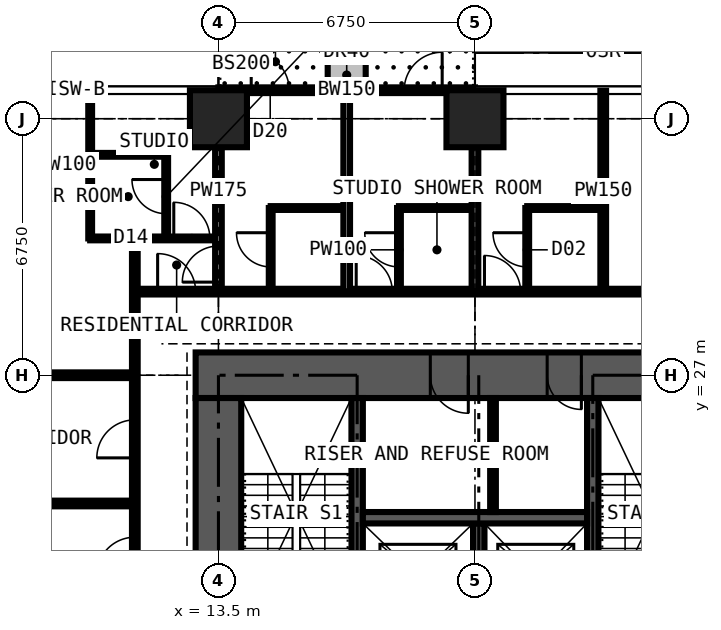
"""IFC4 building model, lengths in metres.
Left out: names, types, materials, properties, quantities, classifications, styles, units other than length and angle.
Written with IfcOpenShell. Run it as: python <this file> out.ifc"""

import sys

from ifc_helpers import new_model, si_unit, direction, frame, frame_2d, origin, origin_2d, place, context, subcontext, project, spatial, rectangle, extrude, element, fill, save


model = new_model("IFC4")
c1 = context("Model", 3, precision=1e-05, world=origin(), true_north=direction((0.0, 1.0)))
c2 = subcontext(c1, "Body", "Model", "MODEL_VIEW")
j1 = project(units=[si_unit("LENGTHUNIT", "METRE"), si_unit("PLANEANGLEUNIT", "RADIAN")], contexts=[c1])
p1 = place(None, origin())
s1 = spatial("IfcSite", under=j1, at=p1, CompositionType="ELEMENT")
p2 = place(p1, origin())
s2 = spatial("IfcBuilding", under=s1, at=p2, CompositionType="ELEMENT")
p3 = place(p2, frame((0.0, 0.0, 116.1)))
s3 = spatial("IfcBuildingStorey", under=s2, at=p3, CompositionType="ELEMENT", Elevation=116.1)
for number, where, z_axis, x_axis in (
    (1, (13.5, 33.75, 0.0), (0.0, 0.0, 1.0), (1.0, 0.0, 0.0)),
    (2, (20.25, 33.75, 0.0), (0.0, 0.0, 1.0), (1.0, 0.0, 0.0)),
):
    element("IfcColumn", number, at=place(p3, frame(where, z_axis=z_axis, x_axis=x_axis)), inside=s3, PredefinedType="COLUMN", context=c2, shape_type="SweptSolid", body=[
        extrude(rectangle(XDim=1.5, YDim=1.5, at=origin_2d()), origin(), (0.0, 0.0, 1.0), 3.6),
    ])
p4 = place(p3, frame((27.6, 27.0, 0.0), z_axis=(0.0, 0.0, 1.0), x_axis=(-1.0, 0.0, 0.0)))
e3 = element("IfcWall", 3, at=p4, inside=s3, PredefinedType="SHEAR", context=c2, shape_type="SweptSolid", body=[
    extrude(rectangle(XDim=14.7, YDim=1.2, at=frame_2d((7.35, 0.0))), origin(), (0.0, 0.0, 1.0), 3.6),
])
p5 = place(p4, frame((4.55, 0.0, 0.0)))
e4 = element("IfcOpeningElement", 4, at=p5, cuts=e3, PredefinedType="OPENING", context=c2, shape_type="SweptSolid", body=[
    extrude(rectangle(XDim=0.9, YDim=2.2, at=frame_2d((0.45, 1.1))), frame((0.0, 0.61, 0.0), z_axis=(0.0, -1.0, 0.0), x_axis=(1.0, 0.0, 0.0)), (0.0, 0.0, 1.0), 1.22),
])
p6 = place(p4, frame((7.525, 0.0, 0.0)))
e5 = element("IfcOpeningElement", 5, at=p6, cuts=e3, PredefinedType="OPENING", context=c2, shape_type="SweptSolid", body=[
    extrude(rectangle(XDim=1.0, YDim=2.2, at=frame_2d((0.5, 1.1))), frame((0.0, 0.61, 0.0), z_axis=(0.0, -1.0, 0.0), x_axis=(1.0, 0.0, 0.0)), (0.0, 0.0, 1.0), 1.22),
])
p7 = place(p3, frame((13.5, 26.4, 0.0), z_axis=(0.0, 0.0, 1.0), x_axis=(0.0, -1.0, 0.0)))
e6 = element("IfcWall", 6, at=p7, inside=s3, PredefinedType="SHEAR", context=c2, shape_type="SweptSolid", body=[
    extrude(rectangle(XDim=12.3, YDim=1.2, at=frame_2d((6.15, 0.0))), origin(), (0.0, 0.0, 1.0), 3.6),
])
p8 = place(p7, frame((7.45, 0.0, 0.0)))
e7 = element("IfcOpeningElement", 7, at=p8, cuts=e6, PredefinedType="OPENING", context=c2, shape_type="SweptSolid", body=[
    extrude(rectangle(XDim=1.2, YDim=2.2, at=frame_2d((0.6, 1.1))), frame((0.0, 0.61, 0.0), z_axis=(0.0, -1.0, 0.0), x_axis=(1.0, 0.0, 0.0)), (0.0, 0.0, 1.0), 1.22),
])
p9 = place(p3, frame((13.5, 34.5, 0.0), z_axis=(0.0, 0.0, 1.0), x_axis=(1.0, 0.0, 0.0)))
e8 = element("IfcWall", 8, at=p9, inside=s3, PredefinedType="SOLIDWALL", context=c2, shape_type="SweptSolid", body=[
    extrude(rectangle(XDim=6.75, YDim=0.15, at=frame_2d((3.375, 0.0))), origin(), (0.0, 0.0, 1.0), 3.375),
])
p10 = place(p9, frame((0.863, 0.0, 0.0)))
e9 = element("IfcOpeningElement", 9, at=p10, cuts=e8, PredefinedType="OPENING", context=c2, shape_type="SweptSolid", body=[
    extrude(rectangle(XDim=1.0, YDim=2.2, at=frame_2d((0.5, 1.1))), frame((0.0, 0.085, 0.0), z_axis=(0.0, -1.0, 0.0), x_axis=(1.0, 0.0, 0.0)), (0.0, 0.0, 1.0), 0.17),
])
p11 = place(p9, frame((1.975, 0.0, 0.9)))
e10 = element("IfcOpeningElement", 10, at=p11, cuts=e8, PredefinedType="OPENING", context=c2, shape_type="SweptSolid", body=[
    extrude(rectangle(XDim=1.2, YDim=1.8, at=frame_2d((0.6, 0.9))), frame((0.0, 0.085, 0.0), z_axis=(0.0, -1.0, 0.0), x_axis=(1.0, 0.0, 0.0)), (0.0, 0.0, 1.0), 0.17),
])
p12 = place(p9, frame((4.887, 0.0, 0.0)))
e11 = element("IfcOpeningElement", 11, at=p12, cuts=e8, PredefinedType="OPENING", context=c2, shape_type="SweptSolid", body=[
    extrude(rectangle(XDim=1.0, YDim=2.2, at=frame_2d((0.5, 1.1))), frame((0.0, 0.085, 0.0), z_axis=(0.0, -1.0, 0.0), x_axis=(1.0, 0.0, 0.0)), (0.0, 0.0, 1.0), 0.17),
])
p13 = place(p9, frame((3.575, 0.0, 0.9)))
e12 = element("IfcOpeningElement", 12, at=p13, cuts=e8, PredefinedType="OPENING", context=c2, shape_type="SweptSolid", body=[
    extrude(rectangle(XDim=1.2, YDim=1.8, at=frame_2d((0.6, 0.9))), frame((0.0, 0.085, 0.0), z_axis=(0.0, -1.0, 0.0), x_axis=(1.0, 0.0, 0.0)), (0.0, 0.0, 1.0), 0.17),
])
p14 = place(p3, frame((16.875, 34.6, 0.0), z_axis=(0.0, 0.0, 1.0), x_axis=(0.0, 1.0, 0.0)))
e13 = element("IfcWall", 13, at=p14, inside=s3, PredefinedType="USERDEFINED", context=c2, shape_type="SweptSolid", body=[
    extrude(rectangle(XDim=2.2, YDim=1.0, at=frame_2d((1.1, 0.0))), origin(), (0.0, 0.0, 1.0), 0.9),
])
for number, where, z_axis, x_axis in (
    (14, (17.15, 20.3, 0.0), (0.0, 0.0, 1.0), (0.0, 1.0, 0.0)),
    (15, (23.35, 20.3, 0.0), (0.0, 0.0, 1.0), (0.0, 1.0, 0.0)),
):
    element("IfcWall", number, at=place(p3, frame(where, z_axis=z_axis, x_axis=x_axis)), inside=s3, PredefinedType="SHEAR", context=c2, shape_type="SweptSolid", body=[
        extrude(rectangle(XDim=6.1, YDim=0.3, at=frame_2d((3.05, 0.0))), origin(), (0.0, 0.0, 1.0), 3.6),
    ])
p15 = place(p3, frame((20.35, 20.3, 0.0), z_axis=(0.0, 0.0, 1.0), x_axis=(0.0, 1.0, 0.0)))
e16 = element("IfcWall", 16, at=p15, inside=s3, PredefinedType="SHEAR", context=c2, shape_type="SweptSolid", body=[
    extrude(rectangle(XDim=2.8, YDim=0.3, at=frame_2d((1.4, 0.0))), origin(), (0.0, 0.0, 1.0), 3.6),
])
p16 = place(p3, frame((17.3, 23.25, 0.0), z_axis=(0.0, 0.0, 1.0), x_axis=(1.0, 0.0, 0.0)))
e17 = element("IfcWall", 17, at=p16, inside=s3, PredefinedType="SHEAR", context=c2, shape_type="SweptSolid", body=[
    extrude(rectangle(XDim=5.9, YDim=0.3, at=frame_2d((2.95, 0.0))), origin(), (0.0, 0.0, 1.0), 3.6),
])
p17 = place(p3, frame((20.725, 23.4, 0.0), z_axis=(0.0, 0.0, 1.0), x_axis=(0.0, 1.0, 0.0)))
e18 = element("IfcWall", 18, at=p17, inside=s3, PredefinedType="PARTITIONING", context=c2, shape_type="SweptSolid", body=[
    extrude(rectangle(XDim=3.0, YDim=0.15, at=frame_2d((1.5, 0.0))), origin(), (0.0, 0.0, 1.0), 3.375),
])
p18 = place(p3, frame((-0.734, 23.625, 0.0), z_axis=(0.0, 0.0, 1.0), x_axis=(1.0, 0.0, 0.0)))
e19 = element("IfcWall", 19, at=p18, inside=s3, PredefinedType="PARTITIONING", context=c2, shape_type="SweptSolid", body=[
    extrude(rectangle(XDim=12.034, YDim=0.15, at=frame_2d((6.017, 0.0))), origin(), (0.0, 0.0, 1.0), 3.375),
])
p19 = place(p3, frame((-0.734, 27.0, 0.0), z_axis=(0.0, 0.0, 1.0), x_axis=(1.0, 0.0, 0.0)))
e20 = element("IfcWall", 20, at=p19, inside=s3, PredefinedType="PARTITIONING", context=c2, shape_type="SweptSolid", body=[
    extrude(rectangle(XDim=12.034, YDim=0.15, at=frame_2d((6.017, 0.0))), origin(), (0.0, 0.0, 1.0), 2.806),
])
p20 = place(p19, frame((8.234, 0.0, 0.0)))
e21 = element("IfcOpeningElement", 21, at=p20, cuts=e20, PredefinedType="OPENING", context=c2, shape_type="SweptSolid", body=[
    extrude(rectangle(XDim=1.0, YDim=2.2, at=frame_2d((0.5, 1.1))), frame((0.0, 0.085, 0.0), z_axis=(0.0, -1.0, 0.0), x_axis=(1.0, 0.0, 0.0)), (0.0, 0.0, 1.0), 0.17),
])
p21 = place(p3, frame((10.125, 30.6, 0.0), z_axis=(0.0, 0.0, 1.0), x_axis=(0.0, 1.0, 0.0)))
e22 = element("IfcWall", 22, at=p21, inside=s3, PredefinedType="PARTITIONING", context=c2, shape_type="SweptSolid", body=[
    extrude(rectangle(XDim=3.884, YDim=0.1, at=frame_2d((1.942, 0.0))), origin(), (0.0, 0.0, 1.0), 3.375),
])
p22 = place(p3, frame((10.125, 30.6, 0.0), z_axis=(0.0, 0.0, 1.0), x_axis=(1.0, 0.0, 0.0)))
e23 = element("IfcWall", 23, at=p22, inside=s3, PredefinedType="PARTITIONING", context=c2, shape_type="SweptSolid", body=[
    extrude(rectangle(XDim=3.375, YDim=0.1, at=frame_2d((1.688, 0.0))), origin(), (0.0, 0.0, 1.0), 3.375),
])
p23 = place(p22, frame((2.2, 0.0, 0.0)))
e24 = element("IfcOpeningElement", 24, at=p23, cuts=e23, PredefinedType="OPENING", context=c2, shape_type="SweptSolid", body=[
    extrude(rectangle(XDim=0.95, YDim=2.2, at=frame_2d((0.475, 1.1))), frame((0.0, 0.06, 0.0), z_axis=(0.0, -1.0, 0.0), x_axis=(1.0, 0.0, 0.0)), (0.0, 0.0, 1.0), 0.12),
])
p24 = place(p3, frame((10.125, 32.8, 0.0), z_axis=(0.0, 0.0, 1.0), x_axis=(1.0, 0.0, 0.0)))
e25 = element("IfcWall", 25, at=p24, inside=s3, PredefinedType="PARTITIONING", context=c2, shape_type="SweptSolid", body=[
    extrude(rectangle(XDim=2.0, YDim=0.1, at=frame_2d((1.0, 0.0))), origin(), (0.0, 0.0, 1.0), 3.375),
])
p25 = place(p3, frame((11.3, 11.3, 0.0), z_axis=(0.0, 0.0, 1.0), x_axis=(0.0, 1.0, 0.0)))
e26 = element("IfcWall", 26, at=p25, inside=s3, PredefinedType="PARTITIONING", context=c2, shape_type="SweptSolid", body=[
    extrude(rectangle(XDim=19.3, YDim=0.15, at=frame_2d((9.65, 0.0))), origin(), (0.0, 0.0, 1.0), 3.375),
])
p26 = place(p25, frame((13.525, 0.0, 0.0)))
e27 = element("IfcOpeningElement", 27, at=p26, cuts=e26, PredefinedType="OPENING", context=c2, shape_type="SweptSolid", body=[
    extrude(rectangle(XDim=1.0, YDim=2.2, at=frame_2d((0.5, 1.1))), frame((0.0, 0.085, 0.0), z_axis=(0.0, -1.0, 0.0), x_axis=(1.0, 0.0, 0.0)), (0.0, 0.0, 1.0), 0.17),
])
p27 = place(p25, frame((10.438, 0.0, 0.0)))
e28 = element("IfcOpeningElement", 28, at=p27, cuts=e26, PredefinedType="OPENING", context=c2, shape_type="SweptSolid", body=[
    extrude(rectangle(XDim=1.0, YDim=2.2, at=frame_2d((0.5, 1.1))), frame((0.0, 0.085, 0.0), z_axis=(0.0, -1.0, 0.0), x_axis=(1.0, 0.0, 0.0)), (0.0, 0.0, 1.0), 0.17),
])
p28 = place(p3, frame((11.3, 29.2, 0.0), z_axis=(0.0, 0.0, 1.0), x_axis=(1.0, 0.0, 0.0)))
e29 = element("IfcWall", 29, at=p28, inside=s3, PredefinedType="PARTITIONING", context=c2, shape_type="SweptSolid", body=[
    extrude(rectangle(XDim=19.075, YDim=0.15, at=frame_2d((9.538, 0.0))), origin(), (0.0, 0.0, 1.0), 3.375),
])
p29 = place(p28, frame((5.825, 0.0, 0.0)))
e30 = element("IfcOpeningElement", 30, at=p29, cuts=e29, PredefinedType="OPENING", context=c2, shape_type="SweptSolid", body=[
    extrude(rectangle(XDim=0.95, YDim=2.2, at=frame_2d((0.475, 1.1))), frame((0.0, 0.085, 0.0), z_axis=(0.0, -1.0, 0.0), x_axis=(1.0, 0.0, 0.0)), (0.0, 0.0, 1.0), 0.17),
])
p30 = place(p28, frame((9.2, 0.0, 0.0)))
e31 = element("IfcOpeningElement", 31, at=p30, cuts=e29, PredefinedType="OPENING", context=c2, shape_type="SweptSolid", body=[
    extrude(rectangle(XDim=0.95, YDim=2.2, at=frame_2d((0.475, 1.1))), frame((0.0, 0.085, 0.0), z_axis=(0.0, -1.0, 0.0), x_axis=(1.0, 0.0, 0.0)), (0.0, 0.0, 1.0), 0.17),
])
p31 = place(p28, frame((0.6, 0.0, 0.0)))
e32 = element("IfcOpeningElement", 32, at=p31, cuts=e29, PredefinedType="OPENING", context=c2, shape_type="SweptSolid", body=[
    extrude(rectangle(XDim=1.0, YDim=2.2, at=frame_2d((0.5, 1.1))), frame((0.0, 0.085, 0.0), z_axis=(0.0, -1.0, 0.0), x_axis=(1.0, 0.0, 0.0)), (0.0, 0.0, 1.0), 0.17),
])
p32 = place(p3, frame((12.125, 30.6, 0.0), z_axis=(0.0, 0.0, 1.0), x_axis=(0.0, 1.0, 0.0)))
e33 = element("IfcWall", 33, at=p32, inside=s3, PredefinedType="PARTITIONING", context=c2, shape_type="SweptSolid", body=[
    extrude(rectangle(XDim=2.2, YDim=0.1, at=frame_2d((1.1, 0.0))), origin(), (0.0, 0.0, 1.0), 3.375),
])
p33 = place(p32, frame((0.65, 0.0, 0.0)))
e34 = element("IfcOpeningElement", 34, at=p33, cuts=e33, PredefinedType="OPENING", context=c2, shape_type="SweptSolid", body=[
    extrude(rectangle(XDim=0.9, YDim=2.2, at=frame_2d((0.45, 1.1))), frame((0.0, 0.06, 0.0), z_axis=(0.0, -1.0, 0.0), x_axis=(1.0, 0.0, 0.0)), (0.0, 0.0, 1.0), 0.12),
])
p34 = place(p3, frame((13.5, 29.2, 0.0), z_axis=(0.0, 0.0, 1.0), x_axis=(0.0, 1.0, 0.0)))
e35 = element("IfcWall", 35, at=p34, inside=s3, PredefinedType="PARTITIONING", context=c2, shape_type="SweptSolid", body=[
    extrude(rectangle(XDim=5.284, YDim=0.175, at=frame_2d((2.642, 0.0))), origin(), (0.0, 0.0, 1.0), 2.806),
])
p35 = place(p34, frame((0.25, 0.0, 0.0)))
e36 = element("IfcOpeningElement", 36, at=p35, cuts=e35, PredefinedType="OPENING", context=c2, shape_type="SweptSolid", body=[
    extrude(rectangle(XDim=0.95, YDim=2.2, at=frame_2d((0.475, 1.1))), frame((0.0, 0.097, 0.0), z_axis=(0.0, -1.0, 0.0), x_axis=(1.0, 0.0, 0.0)), (0.0, 0.0, 1.0), 0.195),
])
p36 = place(p3, frame((14.875, 29.2, 0.0), z_axis=(0.0, 0.0, 1.0), x_axis=(0.0, 1.0, 0.0)))
e37 = element("IfcWall", 37, at=p36, inside=s3, PredefinedType="PARTITIONING", context=c2, shape_type="SweptSolid", body=[
    extrude(rectangle(XDim=2.2, YDim=0.1, at=frame_2d((1.1, 0.0))), origin(), (0.0, 0.0, 1.0), 3.375),
])
p37 = place(p36, frame((0.65, 0.0, 0.0)))
e38 = element("IfcOpeningElement", 38, at=p37, cuts=e37, PredefinedType="OPENING", context=c2, shape_type="SweptSolid", body=[
    extrude(rectangle(XDim=0.9, YDim=2.2, at=frame_2d((0.45, 1.1))), frame((0.0, 0.06, 0.0), z_axis=(0.0, -1.0, 0.0), x_axis=(1.0, 0.0, 0.0)), (0.0, 0.0, 1.0), 0.12),
])
p38 = place(p3, frame((14.875, 31.4, 0.0), z_axis=(0.0, 0.0, 1.0), x_axis=(1.0, 0.0, 0.0)))
e39 = element("IfcWall", 39, at=p38, inside=s3, PredefinedType="PARTITIONING", context=c2, shape_type="SweptSolid", body=[
    extrude(rectangle(XDim=2.0, YDim=0.1, at=frame_2d((1.0, 0.0))), origin(), (0.0, 0.0, 1.0), 3.375),
])
p39 = place(p3, frame((16.875, 29.2, 0.0), z_axis=(0.0, 0.0, 1.0), x_axis=(0.0, 1.0, 0.0)))
e40 = element("IfcWall", 40, at=p39, inside=s3, PredefinedType="PARTITIONING", context=c2, shape_type="SweptSolid", body=[
    extrude(rectangle(XDim=5.284, YDim=0.175, at=frame_2d((2.642, 0.0))), origin(), (0.0, 0.0, 1.0), 3.375),
])
p40 = place(p3, frame((18.25, 29.2, 0.0), z_axis=(0.0, 0.0, 1.0), x_axis=(0.0, 1.0, 0.0)))
e41 = element("IfcWall", 41, at=p40, inside=s3, PredefinedType="PARTITIONING", context=c2, shape_type="SweptSolid", body=[
    extrude(rectangle(XDim=2.2, YDim=0.1, at=frame_2d((1.1, 0.0))), origin(), (0.0, 0.0, 1.0), 3.375),
])
p41 = place(p40, frame((0.65, 0.0, 0.0)))
e42 = element("IfcOpeningElement", 42, at=p41, cuts=e41, PredefinedType="OPENING", context=c2, shape_type="SweptSolid", body=[
    extrude(rectangle(XDim=0.9, YDim=2.2, at=frame_2d((0.45, 1.1))), frame((0.0, 0.06, 0.0), z_axis=(0.0, -1.0, 0.0), x_axis=(1.0, 0.0, 0.0)), (0.0, 0.0, 1.0), 0.12),
])
p42 = place(p3, frame((18.25, 31.4, 0.0), z_axis=(0.0, 0.0, 1.0), x_axis=(1.0, 0.0, 0.0)))
e43 = element("IfcWall", 43, at=p42, inside=s3, PredefinedType="PARTITIONING", context=c2, shape_type="SweptSolid", body=[
    extrude(rectangle(XDim=2.0, YDim=0.1, at=frame_2d((1.0, 0.0))), origin(), (0.0, 0.0, 1.0), 3.375),
])
p43 = place(p3, frame((20.25, 29.2, 0.0), z_axis=(0.0, 0.0, 1.0), x_axis=(0.0, 1.0, 0.0)))
e44 = element("IfcWall", 44, at=p43, inside=s3, PredefinedType="PARTITIONING", context=c2, shape_type="SweptSolid", body=[
    extrude(rectangle(XDim=5.284, YDim=0.175, at=frame_2d((2.642, 0.0))), origin(), (0.0, 0.0, 1.0), 2.61),
])
p44 = place(p3, frame((21.625, 29.2, 0.0), z_axis=(0.0, 0.0, 1.0), x_axis=(0.0, 1.0, 0.0)))
e45 = element("IfcWall", 45, at=p44, inside=s3, PredefinedType="PARTITIONING", context=c2, shape_type="SweptSolid", body=[
    extrude(rectangle(XDim=2.2, YDim=0.1, at=frame_2d((1.1, 0.0))), origin(), (0.0, 0.0, 1.0), 3.375),
])
p45 = place(p44, frame((0.65, 0.0, 0.0)))
e46 = element("IfcOpeningElement", 46, at=p45, cuts=e45, PredefinedType="OPENING", context=c2, shape_type="SweptSolid", body=[
    extrude(rectangle(XDim=0.9, YDim=2.2, at=frame_2d((0.45, 1.1))), frame((0.0, 0.06, 0.0), z_axis=(0.0, -1.0, 0.0), x_axis=(1.0, 0.0, 0.0)), (0.0, 0.0, 1.0), 0.12),
])
p46 = place(p3, frame((21.625, 31.4, 0.0), z_axis=(0.0, 0.0, 1.0), x_axis=(1.0, 0.0, 0.0)))
e47 = element("IfcWall", 47, at=p46, inside=s3, PredefinedType="PARTITIONING", context=c2, shape_type="SweptSolid", body=[
    extrude(rectangle(XDim=2.0, YDim=0.1, at=frame_2d((1.0, 0.0))), origin(), (0.0, 0.0, 1.0), 3.375),
])
p47 = place(p3, frame((23.625, 29.2, 0.0), z_axis=(0.0, 0.0, 1.0), x_axis=(0.0, 1.0, 0.0)))
e48 = element("IfcWall", 48, at=p47, inside=s3, PredefinedType="PARTITIONING", context=c2, shape_type="SweptSolid", body=[
    extrude(rectangle(XDim=5.284, YDim=0.15, at=frame_2d((2.642, 0.0))), origin(), (0.0, 0.0, 1.0), 3.375),
])
p48 = place(p10, origin())
e49 = element("IfcDoor", 49, at=p48, inside=s3, OperationType="SINGLE_SWING_LEFT", PredefinedType="DOOR", context=c2, shape_type="SweptSolid", body=[
    extrude(rectangle(XDim=1.0, YDim=2.2, at=frame_2d((0.5, 1.1))), frame((0.0, 0.025, 0.0), z_axis=(0.0, -1.0, 0.0), x_axis=(1.0, 0.0, 0.0)), (0.0, 0.0, 1.0), 0.05),
])
fill(e9, e49)
p49 = place(p11, origin())
e50 = element("IfcWindow", 50, at=p49, inside=s3, PartitioningType="SINGLE_PANEL", PredefinedType="WINDOW", context=c2, shape_type="SweptSolid", body=[
    extrude(rectangle(XDim=1.2, YDim=1.8, at=frame_2d((0.6, 0.9))), frame((0.0, 0.03, 0.0), z_axis=(0.0, -1.0, 0.0), x_axis=(1.0, 0.0, 0.0)), (0.0, 0.0, 1.0), 0.06),
])
fill(e10, e50)
p50 = place(p12, origin())
e51 = element("IfcDoor", 51, at=p50, inside=s3, OperationType="SINGLE_SWING_RIGHT", PredefinedType="DOOR", context=c2, shape_type="SweptSolid", body=[
    extrude(rectangle(XDim=1.0, YDim=2.2, at=frame_2d((0.5, 1.1))), frame((0.0, 0.025, 0.0), z_axis=(0.0, -1.0, 0.0), x_axis=(1.0, 0.0, 0.0)), (0.0, 0.0, 1.0), 0.05),
])
fill(e11, e51)
p51 = place(p13, origin())
e52 = element("IfcWindow", 52, at=p51, inside=s3, PartitioningType="SINGLE_PANEL", PredefinedType="WINDOW", context=c2, shape_type="SweptSolid", body=[
    extrude(rectangle(XDim=1.2, YDim=1.8, at=frame_2d((0.6, 0.9))), frame((0.0, 0.03, 0.0), z_axis=(0.0, -1.0, 0.0), x_axis=(1.0, 0.0, 0.0)), (0.0, 0.0, 1.0), 0.06),
])
fill(e12, e52)
p52 = place(p5, origin())
e53 = element("IfcDoor", 53, at=p52, inside=s3, OperationType="SINGLE_SWING_LEFT", PredefinedType="DOOR", context=c2, shape_type="SweptSolid", body=[
    extrude(rectangle(XDim=0.9, YDim=2.2, at=frame_2d((0.45, 1.1))), frame((0.0, 0.4, 0.0), z_axis=(0.0, -1.0, 0.0), x_axis=(1.0, 0.0, 0.0)), (0.0, 0.0, 1.0), 0.8),
])
fill(e4, e53)
p53 = place(p6, origin())
e54 = element("IfcDoor", 54, at=p53, inside=s3, OperationType="SINGLE_SWING_LEFT", PredefinedType="DOOR", context=c2, shape_type="SweptSolid", body=[
    extrude(rectangle(XDim=1.0, YDim=2.2, at=frame_2d((0.5, 1.1))), frame((0.0, 0.025, 0.0), z_axis=(0.0, -1.0, 0.0), x_axis=(1.0, 0.0, 0.0)), (0.0, 0.0, 1.0), 0.05),
])
fill(e5, e54)
p54 = place(p23, origin())
e55 = element("IfcDoor", 55, at=p54, inside=s3, OperationType="SINGLE_SWING_LEFT", PredefinedType="DOOR", context=c2, shape_type="SweptSolid", body=[
    extrude(rectangle(XDim=0.95, YDim=2.2, at=frame_2d((0.475, 1.1))), frame((0.0, 0.025, 0.0), z_axis=(0.0, -1.0, 0.0), x_axis=(1.0, 0.0, 0.0)), (0.0, 0.0, 1.0), 0.05),
])
fill(e24, e55)
p55 = place(p33, origin())
e56 = element("IfcDoor", 56, at=p55, inside=s3, OperationType="SINGLE_SWING_RIGHT", PredefinedType="DOOR", context=c2, shape_type="SweptSolid", body=[
    extrude(rectangle(XDim=0.9, YDim=2.2, at=frame_2d((0.45, 1.1))), frame((0.0, 0.025, 0.0), z_axis=(0.0, -1.0, 0.0), x_axis=(1.0, 0.0, 0.0)), (0.0, 0.0, 1.0), 0.05),
])
fill(e34, e56)
p56 = place(p35, origin())
e57 = element("IfcDoor", 57, at=p56, inside=s3, OperationType="SINGLE_SWING_LEFT", PredefinedType="DOOR", context=c2, shape_type="SweptSolid", body=[
    extrude(rectangle(XDim=0.95, YDim=2.2, at=frame_2d((0.475, 1.1))), frame((0.0, 0.025, 0.0), z_axis=(0.0, -1.0, 0.0), x_axis=(1.0, 0.0, 0.0)), (0.0, 0.0, 1.0), 0.05),
])
fill(e36, e57)
p57 = place(p37, origin())
e58 = element("IfcDoor", 58, at=p57, inside=s3, OperationType="SINGLE_SWING_RIGHT", PredefinedType="DOOR", context=c2, shape_type="SweptSolid", body=[
    extrude(rectangle(XDim=0.9, YDim=2.2, at=frame_2d((0.45, 1.1))), frame((0.0, 0.025, 0.0), z_axis=(0.0, -1.0, 0.0), x_axis=(1.0, 0.0, 0.0)), (0.0, 0.0, 1.0), 0.05),
])
fill(e38, e58)
p58 = place(p29, origin())
e59 = element("IfcDoor", 59, at=p58, inside=s3, OperationType="SINGLE_SWING_LEFT", PredefinedType="DOOR", context=c2, shape_type="SweptSolid", body=[
    extrude(rectangle(XDim=0.95, YDim=2.2, at=frame_2d((0.475, 1.1))), frame((0.0, 0.025, 0.0), z_axis=(0.0, -1.0, 0.0), x_axis=(1.0, 0.0, 0.0)), (0.0, 0.0, 1.0), 0.05),
])
fill(e30, e59)
p59 = place(p41, origin())
e60 = element("IfcDoor", 60, at=p59, inside=s3, OperationType="SINGLE_SWING_RIGHT", PredefinedType="DOOR", context=c2, shape_type="SweptSolid", body=[
    extrude(rectangle(XDim=0.9, YDim=2.2, at=frame_2d((0.45, 1.1))), frame((0.0, 0.025, 0.0), z_axis=(0.0, -1.0, 0.0), x_axis=(1.0, 0.0, 0.0)), (0.0, 0.0, 1.0), 0.05),
])
fill(e42, e60)
p60 = place(p30, origin())
e61 = element("IfcDoor", 61, at=p60, inside=s3, OperationType="SINGLE_SWING_LEFT", PredefinedType="DOOR", context=c2, shape_type="SweptSolid", body=[
    extrude(rectangle(XDim=0.95, YDim=2.2, at=frame_2d((0.475, 1.1))), frame((0.0, 0.025, 0.0), z_axis=(0.0, -1.0, 0.0), x_axis=(1.0, 0.0, 0.0)), (0.0, 0.0, 1.0), 0.05),
])
fill(e31, e61)
p61 = place(p45, origin())
e62 = element("IfcDoor", 62, at=p61, inside=s3, OperationType="SINGLE_SWING_RIGHT", PredefinedType="DOOR", context=c2, shape_type="SweptSolid", body=[
    extrude(rectangle(XDim=0.9, YDim=2.2, at=frame_2d((0.45, 1.1))), frame((0.0, 0.025, 0.0), z_axis=(0.0, -1.0, 0.0), x_axis=(1.0, 0.0, 0.0)), (0.0, 0.0, 1.0), 0.05),
])
fill(e46, e62)
p62 = place(p31, origin())
e63 = element("IfcDoor", 63, at=p62, inside=s3, OperationType="SINGLE_SWING_LEFT", PredefinedType="DOOR", context=c2, shape_type="SweptSolid", body=[
    extrude(rectangle(XDim=1.0, YDim=2.2, at=frame_2d((0.5, 1.1))), frame((0.0, 0.025, 0.0), z_axis=(0.0, -1.0, 0.0), x_axis=(1.0, 0.0, 0.0)), (0.0, 0.0, 1.0), 0.05),
])
fill(e32, e63)
p63 = place(p26, origin())
e64 = element("IfcDoor", 64, at=p63, inside=s3, OperationType="SINGLE_SWING_LEFT", PredefinedType="DOOR", context=c2, shape_type="SweptSolid", body=[
    extrude(rectangle(XDim=1.0, YDim=2.2, at=frame_2d((0.5, 1.1))), frame((0.0, 0.025, 0.0), z_axis=(0.0, -1.0, 0.0), x_axis=(1.0, 0.0, 0.0)), (0.0, 0.0, 1.0), 0.05),
])
fill(e27, e64)
p64 = place(p27, origin())
e65 = element("IfcDoor", 65, at=p64, inside=s3, OperationType="SINGLE_SWING_LEFT", PredefinedType="DOOR", context=c2, shape_type="SweptSolid", body=[
    extrude(rectangle(XDim=1.0, YDim=2.2, at=frame_2d((0.5, 1.1))), frame((0.0, 0.025, 0.0), z_axis=(0.0, -1.0, 0.0), x_axis=(1.0, 0.0, 0.0)), (0.0, 0.0, 1.0), 0.05),
])
fill(e28, e65)
save(model, sys.argv[1])
